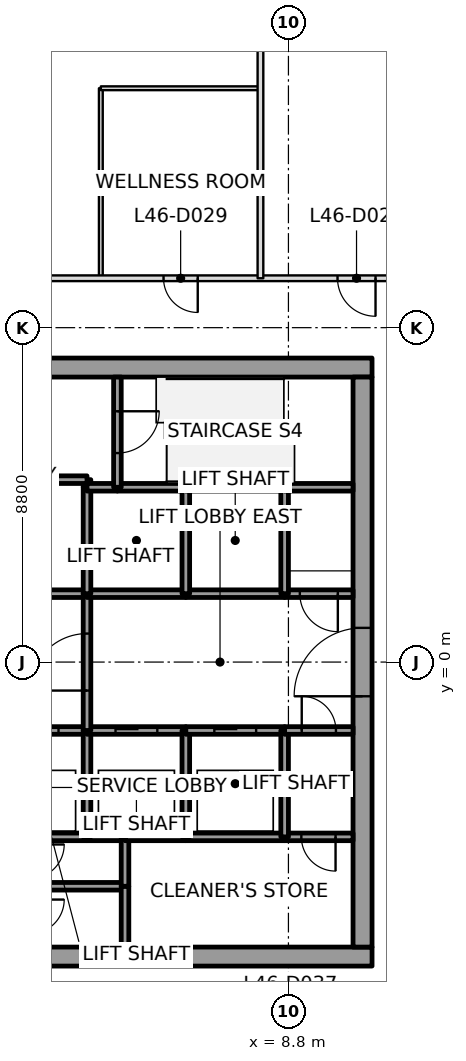
"""IFC4 building model, lengths in metres.
Left out: names, types, materials, properties, quantities, classifications, styles, units other than length and angle.
Written with IfcOpenShell. Run it as: python <this file> out.ifc"""

import sys

from ifc_helpers import new_model, si_unit, direction, frame, frame_2d, origin, place, context, subcontext, project, spatial, rectangle, extrude, element, fill, save


model = new_model("IFC4")
c1 = context("Model", 3, precision=1e-05, world=origin(), true_north=direction((0.0, 1.0)))
c2 = subcontext(c1, "Body", "Model", "MODEL_VIEW")
j1 = project(units=[si_unit("LENGTHUNIT", "METRE"), si_unit("PLANEANGLEUNIT", "RADIAN")], contexts=[c1])
p1 = place(None, origin())
s1 = spatial("IfcSite", under=j1, at=p1, CompositionType="ELEMENT")
p2 = place(p1, origin())
s2 = spatial("IfcBuilding", under=s1, at=p2, CompositionType="ELEMENT")
p3 = place(p2, frame((0.0, 0.0, 205.8)))
s3 = spatial("IfcBuildingStorey", under=s2, at=p3, CompositionType="ELEMENT", Elevation=205.8)
p4 = place(p3, frame((-11.0, -7.75, 0.0), z_axis=(0.0, 0.0, 1.0), x_axis=(1.0, 0.0, 0.0)))
e1 = element("IfcWall", 1, at=p4, inside=s3, PredefinedType="SHEAR", context=c2, shape_type="SweptSolid", body=[
    extrude(rectangle(XDim=22.0, YDim=0.5, at=frame_2d((11.0, 0.0))), origin(), (0.0, 0.0, 1.0), 4.0),
])
p5 = place(p4, frame((10.45, 0.0, 0.0)))
e2 = element("IfcOpeningElement", 2, at=p5, cuts=e1, PredefinedType="OPENING", context=c2, shape_type="SweptSolid", body=[
    extrude(rectangle(XDim=1.1, YDim=2.1, at=frame_2d((0.55, 1.05))), frame((0.0, 0.25, 0.0), z_axis=(0.0, -1.0, 0.0), x_axis=(1.0, 0.0, 0.0)), (0.0, 0.0, 1.0), 0.5),
])
p6 = place(p3, frame((-11.0, 7.75, 0.0), z_axis=(0.0, 0.0, 1.0), x_axis=(1.0, 0.0, 0.0)))
e3 = element("IfcWall", 3, at=p6, inside=s3, PredefinedType="SHEAR", context=c2, shape_type="SweptSolid", body=[
    extrude(rectangle(XDim=22.0, YDim=0.5, at=frame_2d((11.0, 0.0))), origin(), (0.0, 0.0, 1.0), 4.0),
])
p7 = place(p6, frame((10.45, 0.0, 0.0)))
e4 = element("IfcOpeningElement", 4, at=p7, cuts=e3, PredefinedType="OPENING", context=c2, shape_type="SweptSolid", body=[
    extrude(rectangle(XDim=1.1, YDim=2.1, at=frame_2d((0.55, 1.05))), frame((0.0, 0.25, 0.0), z_axis=(0.0, -1.0, 0.0), x_axis=(1.0, 0.0, 0.0)), (0.0, 0.0, 1.0), 0.5),
])
p8 = place(p3, frame((10.75, -7.5, 0.0), z_axis=(0.0, 0.0, 1.0), x_axis=(0.0, 1.0, 0.0)))
e5 = element("IfcWall", 5, at=p8, inside=s3, PredefinedType="SHEAR", context=c2, shape_type="SweptSolid", body=[
    extrude(rectangle(XDim=15.0, YDim=0.5, at=frame_2d((7.5, 0.0))), origin(), (0.0, 0.0, 1.0), 4.0),
])
p9 = place(p8, frame((6.6, 0.0, 0.0)))
e6 = element("IfcOpeningElement", 6, at=p9, cuts=e5, PredefinedType="OPENING", context=c2, shape_type="SweptSolid", body=[
    extrude(rectangle(XDim=1.8, YDim=2.1, at=frame_2d((0.9, 1.05))), frame((0.0, 0.25, 0.0), z_axis=(0.0, -1.0, 0.0), x_axis=(1.0, 0.0, 0.0)), (0.0, 0.0, 1.0), 0.5),
])
p10 = place(p3, frame((0.9, -1.8, 0.0), z_axis=(0.0, 0.0, 1.0), x_axis=(1.0, 0.0, 0.0)))
e7 = element("IfcWall", 7, at=p10, inside=s3, PredefinedType="SOLIDWALL", context=c2, shape_type="SweptSolid", body=[
    extrude(rectangle(XDim=2.6, YDim=0.2, at=frame_2d((1.3, 0.0))), origin(), (0.0, 0.0, 1.0), 3.85),
])
p11 = place(p10, frame((0.75, 0.0, 0.0)))
e8 = element("IfcOpeningElement", 8, at=p11, cuts=e7, PredefinedType="OPENING", context=c2, shape_type="SweptSolid", body=[
    extrude(rectangle(XDim=1.1, YDim=2.1, at=frame_2d((0.55, 1.05))), frame((0.0, 0.1, 0.0), z_axis=(0.0, -1.0, 0.0), x_axis=(1.0, 0.0, 0.0)), (0.0, 0.0, 1.0), 0.2),
])
p12 = place(p3, frame((3.5, 1.8, 0.0), z_axis=(0.0, 0.0, 1.0), x_axis=(-1.0, 0.0, 0.0)))
e9 = element("IfcWall", 9, at=p12, inside=s3, PredefinedType="SOLIDWALL", context=c2, shape_type="SweptSolid", body=[
    extrude(rectangle(XDim=2.6, YDim=0.2, at=frame_2d((1.3, 0.0))), origin(), (0.0, 0.0, 1.0), 3.85),
])
p13 = place(p3, frame((3.5, 4.6, 0.0), z_axis=(0.0, 0.0, 1.0), x_axis=(0.0, 1.0, 0.0)))
e10 = element("IfcWall", 10, at=p13, inside=s3, PredefinedType="SOLIDWALL", context=c2, shape_type="SweptSolid", body=[
    extrude(rectangle(XDim=0.2, YDim=0.2, at=frame_2d((0.1, 0.0))), origin(), (0.0, 0.0, 1.0), 3.85),
])
p14 = place(p3, frame((3.5, 4.8, 0.0), z_axis=(0.0, 0.0, 1.0), x_axis=(-1.0, 0.0, 0.0)))
e11 = element("IfcWall", 11, at=p14, inside=s3, PredefinedType="SOLIDWALL", context=c2, shape_type="SweptSolid", body=[
    extrude(rectangle(XDim=2.6, YDim=0.2, at=frame_2d((1.3, 0.0))), origin(), (0.0, 0.0, 1.0), 3.85),
])
p15 = place(p3, frame((4.5, -5.9, 0.0), z_axis=(0.0, 0.0, 1.0), x_axis=(-1.0, 0.0, 0.0)))
e12 = element("IfcWall", 12, at=p15, inside=s3, PredefinedType="SOLIDWALL", context=c2, shape_type="SweptSolid", body=[
    extrude(rectangle(XDim=2.5, YDim=0.2, at=frame_2d((1.25, 0.0))), origin(), (0.0, 0.0, 1.0), 3.85),
])
p16 = place(p3, frame((3.5, -4.6, 0.0), z_axis=(0.0, 0.0, 1.0), x_axis=(-1.0, 0.0, 0.0)))
e13 = element("IfcWall", 13, at=p16, inside=s3, PredefinedType="SOLIDWALL", context=c2, shape_type="SweptSolid", body=[
    extrude(rectangle(XDim=1.5, YDim=0.2, at=frame_2d((0.75, 0.0))), origin(), (0.0, 0.0, 1.0), 3.85),
])
p17 = place(p3, frame((4.5, -4.6, 0.0), z_axis=(0.0, 0.0, 1.0), x_axis=(-1.0, 0.0, 0.0)))
e14 = element("IfcWall", 14, at=p17, inside=s3, PredefinedType="SOLIDWALL", context=c2, shape_type="SweptSolid", body=[
    extrude(rectangle(XDim=1.0, YDim=0.2, at=frame_2d((0.5, 0.0))), origin(), (0.0, 0.0, 1.0), 3.85),
])
p18 = place(p3, frame((3.5, -4.6, 0.0), z_axis=(0.0, 0.0, 1.0), x_axis=(0.0, 1.0, 0.0)))
e15 = element("IfcWall", 15, at=p18, inside=s3, PredefinedType="SOLIDWALL", context=c2, shape_type="SweptSolid", body=[
    extrude(rectangle(XDim=2.8, YDim=0.2, at=frame_2d((1.4, 0.0))), origin(), (0.0, 0.0, 1.0), 3.85),
])
p19 = place(p3, frame((3.5, -1.8, 0.0), z_axis=(0.0, 0.0, 1.0), x_axis=(1.0, 0.0, 0.0)))
e16 = element("IfcWall", 16, at=p19, inside=s3, PredefinedType="SOLIDWALL", context=c2, shape_type="SweptSolid", body=[
    extrude(rectangle(XDim=2.6, YDim=0.2, at=frame_2d((1.3, 0.0))), origin(), (0.0, 0.0, 1.0), 3.85),
])
p20 = place(p19, frame((0.75, 0.0, 0.0)))
e17 = element("IfcOpeningElement", 17, at=p20, cuts=e16, PredefinedType="OPENING", context=c2, shape_type="SweptSolid", body=[
    extrude(rectangle(XDim=1.1, YDim=2.1, at=frame_2d((0.55, 1.05))), frame((0.0, 0.1, 0.0), z_axis=(0.0, -1.0, 0.0), x_axis=(1.0, 0.0, 0.0)), (0.0, 0.0, 1.0), 0.2),
])
p21 = place(p3, frame((3.5, -1.8, 0.0), z_axis=(0.0, 0.0, 1.0), x_axis=(0.0, 1.0, 0.0)))
e18 = element("IfcWall", 18, at=p21, inside=s3, PredefinedType="SOLIDWALL", context=c2, shape_type="SweptSolid", body=[
    extrude(rectangle(XDim=3.6, YDim=0.2, at=frame_2d((1.8, 0.0))), origin(), (0.0, 0.0, 1.0), 3.85),
])
p22 = place(p21, frame((1.05, 0.0, 0.0)))
e19 = element("IfcOpeningElement", 19, at=p22, cuts=e18, PredefinedType="OPENING", context=c2, shape_type="SweptSolid", body=[
    extrude(rectangle(XDim=1.5, YDim=2.1, at=frame_2d((0.75, 1.05))), frame((0.0, 0.1, 0.0), z_axis=(0.0, -1.0, 0.0), x_axis=(1.0, 0.0, 0.0)), (0.0, 0.0, 1.0), 0.2),
])
p23 = place(p3, frame((6.1, 1.8, 0.0), z_axis=(0.0, 0.0, 1.0), x_axis=(-1.0, 0.0, 0.0)))
e20 = element("IfcWall", 20, at=p23, inside=s3, PredefinedType="SOLIDWALL", context=c2, shape_type="SweptSolid", body=[
    extrude(rectangle(XDim=2.6, YDim=0.2, at=frame_2d((1.3, 0.0))), origin(), (0.0, 0.0, 1.0), 3.85),
])
p24 = place(p3, frame((3.5, 1.8, 0.0), z_axis=(0.0, 0.0, 1.0), x_axis=(0.0, 1.0, 0.0)))
e21 = element("IfcWall", 21, at=p24, inside=s3, PredefinedType="SOLIDWALL", context=c2, shape_type="SweptSolid", body=[
    extrude(rectangle(XDim=2.8, YDim=0.2, at=frame_2d((1.4, 0.0))), origin(), (0.0, 0.0, 1.0), 3.85),
])
p25 = place(p3, frame((4.3, 4.6, 0.0), z_axis=(0.0, 0.0, 1.0), x_axis=(-1.0, 0.0, 0.0)))
e22 = element("IfcWall", 22, at=p25, inside=s3, PredefinedType="SOLIDWALL", context=c2, shape_type="SweptSolid", body=[
    extrude(rectangle(XDim=0.8, YDim=0.2, at=frame_2d((0.4, 0.0))), origin(), (0.0, 0.0, 1.0), 3.85),
])
p26 = place(p3, frame((6.1, 4.6, 0.0), z_axis=(0.0, 0.0, 1.0), x_axis=(-1.0, 0.0, 0.0)))
e23 = element("IfcWall", 23, at=p26, inside=s3, PredefinedType="SOLIDWALL", context=c2, shape_type="SweptSolid", body=[
    extrude(rectangle(XDim=1.8, YDim=0.2, at=frame_2d((0.9, 0.0))), origin(), (0.0, 0.0, 1.0), 3.85),
])
p27 = place(p3, frame((4.3, 7.5, 0.0), z_axis=(0.0, 0.0, 1.0), x_axis=(0.0, -1.0, 0.0)))
e24 = element("IfcWall", 24, at=p27, inside=s3, PredefinedType="SOLIDWALL", context=c2, shape_type="SweptSolid", body=[
    extrude(rectangle(XDim=2.9, YDim=0.2, at=frame_2d((1.45, 0.0))), origin(), (0.0, 0.0, 1.0), 3.85),
])
p28 = place(p27, frame((0.9, 0.0, 0.0)))
e25 = element("IfcOpeningElement", 25, at=p28, cuts=e24, PredefinedType="OPENING", context=c2, shape_type="SweptSolid", body=[
    extrude(rectangle(XDim=1.1, YDim=2.1, at=frame_2d((0.55, 1.05))), frame((0.0, 0.1, 0.0), z_axis=(0.0, -1.0, 0.0), x_axis=(1.0, 0.0, 0.0)), (0.0, 0.0, 1.0), 0.2),
])
p29 = place(p3, frame((4.5, -5.9, 0.0), z_axis=(0.0, 0.0, 1.0), x_axis=(0.0, -1.0, 0.0)))
e26 = element("IfcWall", 26, at=p29, inside=s3, PredefinedType="SOLIDWALL", context=c2, shape_type="SweptSolid", body=[
    extrude(rectangle(XDim=1.6, YDim=0.2, at=frame_2d((0.8, 0.0))), origin(), (0.0, 0.0, 1.0), 3.85),
])
p30 = place(p3, frame((4.5, -4.6, 0.0), z_axis=(0.0, 0.0, 1.0), x_axis=(0.0, -1.0, 0.0)))
e27 = element("IfcWall", 27, at=p30, inside=s3, PredefinedType="SOLIDWALL", context=c2, shape_type="SweptSolid", body=[
    extrude(rectangle(XDim=1.3, YDim=0.2, at=frame_2d((0.65, 0.0))), origin(), (0.0, 0.0, 1.0), 3.85),
])
p31 = place(p3, frame((6.1, -4.6, 0.0), z_axis=(0.0, 0.0, 1.0), x_axis=(-1.0, 0.0, 0.0)))
e28 = element("IfcWall", 28, at=p31, inside=s3, PredefinedType="SOLIDWALL", context=c2, shape_type="SweptSolid", body=[
    extrude(rectangle(XDim=1.6, YDim=0.2, at=frame_2d((0.8, 0.0))), origin(), (0.0, 0.0, 1.0), 3.85),
])
p32 = place(p3, frame((8.7, -4.6, 0.0), z_axis=(0.0, 0.0, 1.0), x_axis=(-1.0, 0.0, 0.0)))
e29 = element("IfcWall", 29, at=p32, inside=s3, PredefinedType="SOLIDWALL", context=c2, shape_type="SweptSolid", body=[
    extrude(rectangle(XDim=2.6, YDim=0.2, at=frame_2d((1.3, 0.0))), origin(), (0.0, 0.0, 1.0), 3.85),
])
p33 = place(p3, frame((6.1, -4.6, 0.0), z_axis=(0.0, 0.0, 1.0), x_axis=(0.0, 1.0, 0.0)))
e30 = element("IfcWall", 30, at=p33, inside=s3, PredefinedType="SOLIDWALL", context=c2, shape_type="SweptSolid", body=[
    extrude(rectangle(XDim=2.8, YDim=0.2, at=frame_2d((1.4, 0.0))), origin(), (0.0, 0.0, 1.0), 3.85),
])
p34 = place(p3, frame((6.1, -1.8, 0.0), z_axis=(0.0, 0.0, 1.0), x_axis=(1.0, 0.0, 0.0)))
e31 = element("IfcWall", 31, at=p34, inside=s3, PredefinedType="SOLIDWALL", context=c2, shape_type="SweptSolid", body=[
    extrude(rectangle(XDim=2.6, YDim=0.2, at=frame_2d((1.3, 0.0))), origin(), (0.0, 0.0, 1.0), 3.85),
])
p35 = place(p34, frame((0.75, 0.0, 0.0)))
e32 = element("IfcOpeningElement", 32, at=p35, cuts=e31, PredefinedType="OPENING", context=c2, shape_type="SweptSolid", body=[
    extrude(rectangle(XDim=1.1, YDim=2.1, at=frame_2d((0.55, 1.05))), frame((0.0, 0.1, 0.0), z_axis=(0.0, -1.0, 0.0), x_axis=(1.0, 0.0, 0.0)), (0.0, 0.0, 1.0), 0.2),
])
p36 = place(p3, frame((8.7, 1.8, 0.0), z_axis=(0.0, 0.0, 1.0), x_axis=(-1.0, 0.0, 0.0)))
e33 = element("IfcWall", 33, at=p36, inside=s3, PredefinedType="SOLIDWALL", context=c2, shape_type="SweptSolid", body=[
    extrude(rectangle(XDim=2.6, YDim=0.2, at=frame_2d((1.3, 0.0))), origin(), (0.0, 0.0, 1.0), 3.85),
])
p37 = place(p3, frame((6.1, 1.8, 0.0), z_axis=(0.0, 0.0, 1.0), x_axis=(0.0, 1.0, 0.0)))
e34 = element("IfcWall", 34, at=p37, inside=s3, PredefinedType="SOLIDWALL", context=c2, shape_type="SweptSolid", body=[
    extrude(rectangle(XDim=2.8, YDim=0.2, at=frame_2d((1.4, 0.0))), origin(), (0.0, 0.0, 1.0), 3.85),
])
p38 = place(p3, frame((8.7, 4.6, 0.0), z_axis=(0.0, 0.0, 1.0), x_axis=(-1.0, 0.0, 0.0)))
e35 = element("IfcWall", 35, at=p38, inside=s3, PredefinedType="SOLIDWALL", context=c2, shape_type="SweptSolid", body=[
    extrude(rectangle(XDim=2.6, YDim=0.2, at=frame_2d((1.3, 0.0))), origin(), (0.0, 0.0, 1.0), 3.85),
])
p39 = place(p3, frame((10.5, -4.6, 0.0), z_axis=(0.0, 0.0, 1.0), x_axis=(-1.0, 0.0, 0.0)))
e36 = element("IfcWall", 36, at=p39, inside=s3, PredefinedType="SOLIDWALL", context=c2, shape_type="SweptSolid", body=[
    extrude(rectangle(XDim=1.8, YDim=0.2, at=frame_2d((0.9, 0.0))), origin(), (0.0, 0.0, 1.0), 3.85),
])
p40 = place(p39, frame((0.46, 0.0, 0.0)))
e37 = element("IfcOpeningElement", 37, at=p40, cuts=e36, PredefinedType="OPENING", context=c2, shape_type="SweptSolid", body=[
    extrude(rectangle(XDim=0.9, YDim=2.1, at=frame_2d((0.45, 1.05))), frame((0.0, 0.1, 0.0), z_axis=(0.0, -1.0, 0.0), x_axis=(1.0, 0.0, 0.0)), (0.0, 0.0, 1.0), 0.2),
])
p41 = place(p3, frame((8.7, -1.8, 0.0), z_axis=(0.0, 0.0, 1.0), x_axis=(0.0, -1.0, 0.0)))
e38 = element("IfcWall", 38, at=p41, inside=s3, PredefinedType="SOLIDWALL", context=c2, shape_type="SweptSolid", body=[
    extrude(rectangle(XDim=2.8, YDim=0.2, at=frame_2d((1.4, 0.0))), origin(), (0.0, 0.0, 1.0), 3.85),
])
p42 = place(p3, frame((8.7, -1.8, 0.0), z_axis=(0.0, 0.0, 1.0), x_axis=(1.0, 0.0, 0.0)))
e39 = element("IfcWall", 39, at=p42, inside=s3, PredefinedType="SOLIDWALL", context=c2, shape_type="SweptSolid", body=[
    extrude(rectangle(XDim=1.8, YDim=0.2, at=frame_2d((0.9, 0.0))), origin(), (0.0, 0.0, 1.0), 3.85),
])
p43 = place(p42, frame((0.45, 0.0, 0.0)))
e40 = element("IfcOpeningElement", 40, at=p43, cuts=e39, PredefinedType="OPENING", context=c2, shape_type="SweptSolid", body=[
    extrude(rectangle(XDim=0.9, YDim=2.1, at=frame_2d((0.45, 1.05))), frame((0.0, 0.1, 0.0), z_axis=(0.0, -1.0, 0.0), x_axis=(1.0, 0.0, 0.0)), (0.0, 0.0, 1.0), 0.2),
])
p44 = place(p3, frame((10.5, 1.8, 0.0), z_axis=(0.0, 0.0, 1.0), x_axis=(-1.0, 0.0, 0.0)))
e41 = element("IfcWall", 41, at=p44, inside=s3, PredefinedType="SOLIDWALL", context=c2, shape_type="SweptSolid", body=[
    extrude(rectangle(XDim=1.8, YDim=0.2, at=frame_2d((0.9, 0.0))), origin(), (0.0, 0.0, 1.0), 3.85),
])
p45 = place(p44, frame((0.4, 0.0, 0.0)))
e42 = element("IfcOpeningElement", 42, at=p45, cuts=e41, PredefinedType="OPENING", context=c2, shape_type="SweptSolid", body=[
    extrude(rectangle(XDim=1.0, YDim=2.1, at=frame_2d((0.5, 1.05))), frame((0.0, 0.1, 0.0), z_axis=(0.0, -1.0, 0.0), x_axis=(1.0, 0.0, 0.0)), (0.0, 0.0, 1.0), 0.2),
])
p46 = place(p3, frame((8.7, 4.6, 0.0), z_axis=(0.0, 0.0, 1.0), x_axis=(0.0, -1.0, 0.0)))
e43 = element("IfcWall", 43, at=p46, inside=s3, PredefinedType="SOLIDWALL", context=c2, shape_type="SweptSolid", body=[
    extrude(rectangle(XDim=2.8, YDim=0.2, at=frame_2d((1.4, 0.0))), origin(), (0.0, 0.0, 1.0), 3.85),
])
p47 = place(p3, frame((10.5, 4.6, 0.0), z_axis=(0.0, 0.0, 1.0), x_axis=(-1.0, 0.0, 0.0)))
e44 = element("IfcWall", 44, at=p47, inside=s3, PredefinedType="SOLIDWALL", context=c2, shape_type="SweptSolid", body=[
    extrude(rectangle(XDim=1.8, YDim=0.2, at=frame_2d((0.9, 0.0))), origin(), (0.0, 0.0, 1.0), 3.85),
])
p48 = place(p3, frame((8.064, 10.1, 0.0), z_axis=(0.0, 0.0, 1.0), x_axis=(0.0, 1.0, 0.0)))
e45 = element("IfcWall", 45, at=p48, inside=s3, PredefinedType="PARTITIONING", context=c2, shape_type="SweptSolid", body=[
    extrude(rectangle(XDim=16.09, YDim=0.15, at=frame_2d((8.045, 0.0))), origin(), (0.0, 0.0, 1.0), 3.234),
])
p49 = place(p3, frame((13.02, 10.1, 0.0), z_axis=(0.0, 0.0, 1.0), x_axis=(-1.0, 0.0, 0.0)))
e46 = element("IfcWall", 46, at=p49, inside=s3, PredefinedType="PARTITIONING", context=c2, shape_type="SweptSolid", body=[
    extrude(rectangle(XDim=24.956, YDim=0.15, at=frame_2d((12.478, 0.0))), origin(), (0.0, 0.0, 1.0), 3.166),
])
p50 = place(p49, frame((1.928, 0.0, 0.0)))
e47 = element("IfcOpeningElement", 47, at=p50, cuts=e46, PredefinedType="OPENING", context=c2, shape_type="SweptSolid", body=[
    extrude(rectangle(XDim=1.0, YDim=2.1, at=frame_2d((0.5, 1.05))), frame((0.0, 0.075, 0.0), z_axis=(0.0, -1.0, 0.0), x_axis=(1.0, 0.0, 0.0)), (0.0, 0.0, 1.0), 0.15),
])
p51 = place(p49, frame((6.606, 0.0, 0.0)))
e48 = element("IfcOpeningElement", 48, at=p51, cuts=e46, PredefinedType="OPENING", context=c2, shape_type="SweptSolid", body=[
    extrude(rectangle(XDim=0.9, YDim=2.1, at=frame_2d((0.45, 1.05))), frame((0.0, 0.075, 0.0), z_axis=(0.0, -1.0, 0.0), x_axis=(1.0, 0.0, 0.0)), (0.0, 0.0, 1.0), 0.15),
])
p52 = place(p49, frame((12.356, 0.0, 0.0)))
e49 = element("IfcOpeningElement", 49, at=p52, cuts=e46, PredefinedType="OPENING", context=c2, shape_type="SweptSolid", body=[
    extrude(rectangle(XDim=1.0, YDim=2.1, at=frame_2d((0.5, 1.05))), frame((0.0, 0.075, 0.0), z_axis=(0.0, -1.0, 0.0), x_axis=(1.0, 0.0, 0.0)), (0.0, 0.0, 1.0), 0.15),
])
p53 = place(p49, frame((18.106, 0.0, 0.0)))
e50 = element("IfcOpeningElement", 50, at=p53, cuts=e46, PredefinedType="OPENING", context=c2, shape_type="SweptSolid", body=[
    extrude(rectangle(XDim=0.9, YDim=2.1, at=frame_2d((0.45, 1.05))), frame((0.0, 0.075, 0.0), z_axis=(0.0, -1.0, 0.0), x_axis=(1.0, 0.0, 0.0)), (0.0, 0.0, 1.0), 0.15),
])
p54 = place(p49, frame((22.356, 0.0, 0.0)))
e51 = element("IfcOpeningElement", 51, at=p54, cuts=e46, PredefinedType="OPENING", context=c2, shape_type="SweptSolid", body=[
    extrude(rectangle(XDim=1.0, YDim=2.1, at=frame_2d((0.5, 1.05))), frame((0.0, 0.075, 0.0), z_axis=(0.0, -1.0, 0.0), x_axis=(1.0, 0.0, 0.0)), (0.0, 0.0, 1.0), 0.15),
])
p55 = place(p3, frame((3.864, 10.13, 0.0), z_axis=(0.0, 0.0, 1.0), x_axis=(0.0, 1.0, 0.0)))
e52 = element("IfcWall", 52, at=p55, inside=s3, PredefinedType="PARTITIONING", context=c2, shape_type="SweptSolid", body=[
    extrude(rectangle(XDim=4.97, YDim=0.1, at=frame_2d((2.485, 0.0))), origin(), (0.0, 0.0, 1.0), 3.45),
])
p56 = place(p3, frame((3.864, 15.1, 0.0), z_axis=(0.0, 0.0, 1.0), x_axis=(1.0, 0.0, 0.0)))
e53 = element("IfcWall", 53, at=p56, inside=s3, PredefinedType="PARTITIONING", context=c2, shape_type="SweptSolid", body=[
    extrude(rectangle(XDim=4.17, YDim=0.1, at=frame_2d((2.085, 0.0))), origin(), (0.0, 0.0, 1.0), 3.45),
])
p57 = place(p50, origin())
e54 = element("IfcDoor", 54, at=p57, inside=s3, OperationType="SINGLE_SWING_LEFT", PredefinedType="DOOR", context=c2, shape_type="SweptSolid", body=[
    extrude(rectangle(XDim=1.0, YDim=2.1, at=frame_2d((0.5, 1.05))), frame((0.0, 0.025, 0.0), z_axis=(0.0, -1.0, 0.0), x_axis=(1.0, 0.0, 0.0)), (0.0, 0.0, 1.0), 0.05),
])
fill(e47, e54)
p58 = place(p51, origin())
e55 = element("IfcDoor", 55, at=p58, inside=s3, OperationType="SINGLE_SWING_LEFT", PredefinedType="DOOR", context=c2, shape_type="SweptSolid", body=[
    extrude(rectangle(XDim=0.9, YDim=2.1, at=frame_2d((0.45, 1.05))), frame((0.0, 0.025, 0.0), z_axis=(0.0, -1.0, 0.0), x_axis=(1.0, 0.0, 0.0)), (0.0, 0.0, 1.0), 0.05),
])
fill(e48, e55)
p59 = place(p11, origin())
e56 = element("IfcDoor", 56, at=p59, inside=s3, OperationType="SLIDING_TO_LEFT", PredefinedType="DOOR", context=c2, shape_type="SweptSolid", body=[
    extrude(rectangle(XDim=1.1, YDim=2.1, at=frame_2d((0.55, 1.05))), frame((0.0, 0.025, 0.0), z_axis=(0.0, -1.0, 0.0), x_axis=(1.0, 0.0, 0.0)), (0.0, 0.0, 1.0), 0.05),
])
fill(e8, e56)
p60 = place(p20, origin())
e57 = element("IfcDoor", 57, at=p60, inside=s3, OperationType="SLIDING_TO_RIGHT", PredefinedType="DOOR", context=c2, shape_type="SweptSolid", body=[
    extrude(rectangle(XDim=1.1, YDim=2.1, at=frame_2d((0.55, 1.05))), frame((0.0, 0.025, 0.0), z_axis=(0.0, -1.0, 0.0), x_axis=(1.0, 0.0, 0.0)), (0.0, 0.0, 1.0), 0.05),
])
fill(e17, e57)
p61 = place(p35, origin())
e58 = element("IfcDoor", 58, at=p61, inside=s3, OperationType="SLIDING_TO_RIGHT", PredefinedType="DOOR", context=c2, shape_type="SweptSolid", body=[
    extrude(rectangle(XDim=1.1, YDim=2.1, at=frame_2d((0.55, 1.05))), frame((0.0, 0.025, 0.0), z_axis=(0.0, -1.0, 0.0), x_axis=(1.0, 0.0, 0.0)), (0.0, 0.0, 1.0), 0.05),
])
fill(e32, e58)
p62 = place(p22, origin())
e59 = element("IfcDoor", 59, at=p62, inside=s3, OperationType="DOUBLE_DOOR_SINGLE_SWING", PredefinedType="DOOR", context=c2, shape_type="SweptSolid", body=[
    extrude(rectangle(XDim=1.5, YDim=2.1, at=frame_2d((0.75, 1.05))), frame((0.0, 0.025, 0.0), z_axis=(0.0, -1.0, 0.0), x_axis=(1.0, 0.0, 0.0)), (0.0, 0.0, 1.0), 0.05),
])
fill(e19, e59)
p63 = place(p45, origin())
e60 = element("IfcDoor", 60, at=p63, inside=s3, OperationType="SINGLE_SWING_RIGHT", PredefinedType="DOOR", context=c2, shape_type="SweptSolid", body=[
    extrude(rectangle(XDim=1.0, YDim=2.1, at=frame_2d((0.5, 1.05))), frame((0.0, 0.025, 0.0), z_axis=(0.0, -1.0, 0.0), x_axis=(1.0, 0.0, 0.0)), (0.0, 0.0, 1.0), 0.05),
])
fill(e42, e60)
p64 = place(p28, origin())
e61 = element("IfcDoor", 61, at=p64, inside=s3, OperationType="SINGLE_SWING_LEFT", PredefinedType="DOOR", context=c2, shape_type="SweptSolid", body=[
    extrude(rectangle(XDim=1.1, YDim=2.1, at=frame_2d((0.55, 1.05))), frame((0.0, 0.025, 0.0), z_axis=(0.0, -1.0, 0.0), x_axis=(1.0, 0.0, 0.0)), (0.0, 0.0, 1.0), 0.05),
])
fill(e25, e61)
p65 = place(p40, origin())
e62 = element("IfcDoor", 62, at=p65, inside=s3, OperationType="SINGLE_SWING_LEFT", PredefinedType="DOOR", context=c2, shape_type="SweptSolid", body=[
    extrude(rectangle(XDim=0.9, YDim=2.1, at=frame_2d((0.45, 1.05))), frame((0.0, 0.025, 0.0), z_axis=(0.0, -1.0, 0.0), x_axis=(1.0, 0.0, 0.0)), (0.0, 0.0, 1.0), 0.05),
])
fill(e37, e62)
p66 = place(p43, origin())
e63 = element("IfcDoor", 63, at=p66, inside=s3, OperationType="SINGLE_SWING_RIGHT", PredefinedType="DOOR", context=c2, shape_type="SweptSolid", body=[
    extrude(rectangle(XDim=0.9, YDim=2.1, at=frame_2d((0.45, 1.05))), frame((0.0, 0.025, 0.0), z_axis=(0.0, -1.0, 0.0), x_axis=(1.0, 0.0, 0.0)), (0.0, 0.0, 1.0), 0.05),
])
fill(e40, e63)
p67 = place(p9, origin())
e64 = element("IfcDoor", 64, at=p67, inside=s3, OperationType="DOUBLE_DOOR_SINGLE_SWING", PredefinedType="DOOR", context=c2, shape_type="SweptSolid", body=[
    extrude(rectangle(XDim=1.8, YDim=2.1, at=frame_2d((0.9, 1.05))), frame((0.0, 0.025, 0.0), z_axis=(0.0, -1.0, 0.0), x_axis=(1.0, 0.0, 0.0)), (0.0, 0.0, 1.0), 0.05),
])
fill(e6, e64)
save(model, sys.argv[1])
